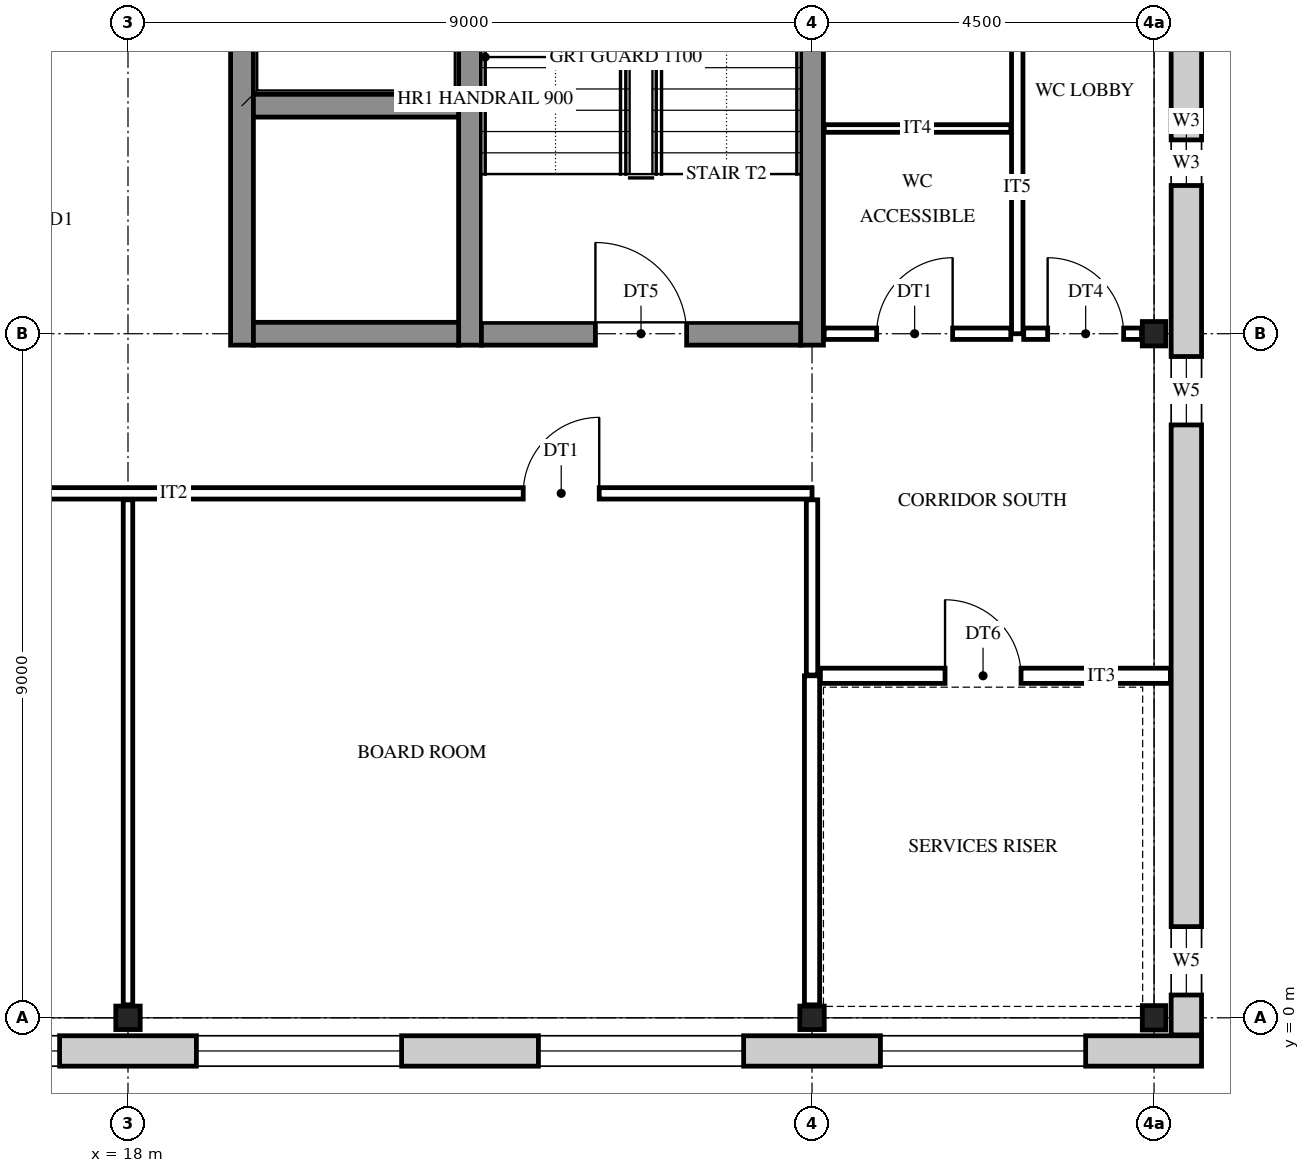
"""IFC4 building model, lengths in metres.
Left out: names, types, materials, properties, quantities, classifications, styles, units other than length and angle.
Written with IfcOpenShell. Run it as: python <this file> out.ifc"""

import sys

from ifc_helpers import new_model, si_unit, direction, frame, frame_2d, origin, origin_2d, place, context, subcontext, project, spatial, rectangle, i_section, extrude, element, fill, save


model = new_model("IFC4")
c1 = context("Model", 3, precision=1e-05, world=origin(), true_north=direction((0.0, 1.0)))
c2 = subcontext(c1, "Body", "Model", "MODEL_VIEW")
j1 = project(units=[si_unit("LENGTHUNIT", "METRE"), si_unit("PLANEANGLEUNIT", "RADIAN")], contexts=[c1])
p1 = place(None, origin())
s1 = spatial("IfcSite", under=j1, at=p1, CompositionType="ELEMENT")
p2 = place(p1, origin())
s2 = spatial("IfcBuilding", under=s1, at=p2, CompositionType="ELEMENT")
p3 = place(p2, frame((0.0, 0.0, 57.0)))
s3 = spatial("IfcBuildingStorey", under=s2, at=p3, CompositionType="ELEMENT", Elevation=57.0)
for number, where, z_axis, x_axis in (
    (1, (18.0, 0.0, 0.0), (0.0, 0.0, 1.0), (0.0, 1.0, 0.0)),
    (2, (27.0, 0.0, 0.0), (0.0, 0.0, 1.0), (0.0, 1.0, 0.0)),
    (3, (31.5, 0.0, 0.0), (0.0, 0.0, 1.0), (1.0, 0.0, 0.0)),
    (4, (31.5, 9.0, 0.0), (0.0, 0.0, 1.0), (1.0, 0.0, 0.0)),
):
    element("IfcColumn", number, at=place(p3, frame(where, z_axis=z_axis, x_axis=x_axis)), inside=s3, PredefinedType="COLUMN", context=c2, shape_type="SweptSolid", body=[
        extrude(i_section(OverallWidth=0.309, OverallDepth=0.321, WebThickness=0.014, FlangeThickness=0.022, FilletRadius=0.017, at=origin_2d()), origin(), (0.0, 0.0, 1.0), 4.2),
    ])
p4 = place(p3, frame((19.5, 8.85, 0.0), z_axis=(0.0, 0.0, 1.0), x_axis=(0.0, 1.0, 0.0)))
e5 = element("IfcWall", 5, at=p4, inside=s3, PredefinedType="SHEAR", context=c2, shape_type="SweptSolid", body=[
    extrude(rectangle(XDim=9.3, YDim=0.3, at=frame_2d((4.65, 0.0))), origin(), (0.0, 0.0, 1.0), 4.2),
])
p5 = place(p4, frame((3.95, 0.0, 0.0)))
e6 = element("IfcOpeningElement", 6, at=p5, cuts=e5, PredefinedType="OPENING", context=c2, shape_type="SweptSolid", body=[
    extrude(rectangle(XDim=1.4, YDim=2.1, at=frame_2d((0.7, 1.05))), frame((0.0, 0.16, 0.0), z_axis=(0.0, -1.0, 0.0), x_axis=(1.0, 0.0, 0.0)), (0.0, 0.0, 1.0), 0.32),
])
p6 = place(p4, frame((7.1, 0.0, 0.0)))
e7 = element("IfcOpeningElement", 7, at=p6, cuts=e5, PredefinedType="OPENING", context=c2, shape_type="SweptSolid", body=[
    extrude(rectangle(XDim=1.1, YDim=2.1, at=frame_2d((0.55, 1.05))), frame((0.0, 0.16, 0.0), z_axis=(0.0, -1.0, 0.0), x_axis=(1.0, 0.0, 0.0)), (0.0, 0.0, 1.0), 0.32),
])
for number, where, z_axis, x_axis in (
    (8, (22.5, 8.85, 0.0), (0.0, 0.0, 1.0), (0.0, 1.0, 0.0)),
    (9, (27.0, 8.85, 0.0), (0.0, 0.0, 1.0), (0.0, 1.0, 0.0)),
):
    element("IfcWall", number, at=place(p3, frame(where, z_axis=z_axis, x_axis=x_axis)), inside=s3, PredefinedType="SHEAR", context=c2, shape_type="SweptSolid", body=[
        extrude(rectangle(XDim=9.3, YDim=0.3, at=frame_2d((4.65, 0.0))), origin(), (0.0, 0.0, 1.0), 4.2),
    ])
p7 = place(p3, frame((19.65, 9.0, 0.0), z_axis=(0.0, 0.0, 1.0), x_axis=(1.0, 0.0, 0.0)))
e10 = element("IfcWall", 10, at=p7, inside=s3, PredefinedType="SHEAR", context=c2, shape_type="SweptSolid", body=[
    extrude(rectangle(XDim=2.7, YDim=0.3, at=frame_2d((1.35, 0.0))), origin(), (0.0, 0.0, 1.0), 4.2),
])
p8 = place(p3, frame((22.65, 9.0, 0.0), z_axis=(0.0, 0.0, 1.0), x_axis=(1.0, 0.0, 0.0)))
e11 = element("IfcWall", 11, at=p8, inside=s3, PredefinedType="SHEAR", context=c2, shape_type="SweptSolid", body=[
    extrude(rectangle(XDim=4.2, YDim=0.3, at=frame_2d((2.1, 0.0))), origin(), (0.0, 0.0, 1.0), 4.2),
])
p9 = place(p8, frame((1.5, 0.0, 0.0)))
e12 = element("IfcOpeningElement", 12, at=p9, cuts=e11, PredefinedType="OPENING", context=c2, shape_type="SweptSolid", body=[
    extrude(rectangle(XDim=1.2, YDim=2.1, at=frame_2d((0.6, 1.05))), frame((0.0, 0.16, 0.0), z_axis=(0.0, -1.0, 0.0), x_axis=(1.0, 0.0, 0.0)), (0.0, 0.0, 1.0), 0.32),
])
p10 = place(p3, frame((19.65, 12.0, 0.0), z_axis=(0.0, 0.0, 1.0), x_axis=(1.0, 0.0, 0.0)))
e13 = element("IfcWall", 13, at=p10, inside=s3, PredefinedType="SHEAR", context=c2, shape_type="SweptSolid", body=[
    extrude(rectangle(XDim=2.7, YDim=0.3, at=frame_2d((1.35, 0.0))), origin(), (0.0, 0.0, 1.0), 4.2),
])
p11 = place(p3, frame((32.125, -0.436, 0.0), z_axis=(0.0, 0.0, 1.0), x_axis=(-1.0, 0.0, 0.0)))
e14 = element("IfcWall", 14, at=p11, inside=s3, PredefinedType="STANDARD", context=c2, shape_type="SweptSolid", body=[
    extrude(rectangle(XDim=32.75, YDim=0.4, at=frame_2d((16.375, 0.0))), origin(), (0.0, 0.0, 1.0), 4.2),
])
p12 = place(p11, frame((28.525, 0.0, 0.9)))
e15 = element("IfcOpeningElement", 15, at=p12, cuts=e14, PredefinedType="OPENING", context=c2, shape_type="SweptSolid", body=[
    extrude(rectangle(XDim=2.7, YDim=2.5, at=frame_2d((1.35, 1.25))), frame((0.0, 0.21, 0.0), z_axis=(0.0, -1.0, 0.0), x_axis=(1.0, 0.0, 0.0)), (0.0, 0.0, 1.0), 0.42),
])
p13 = place(p11, frame((24.025, 0.0, 0.9)))
e16 = element("IfcOpeningElement", 16, at=p13, cuts=e14, PredefinedType="OPENING", context=c2, shape_type="SweptSolid", body=[
    extrude(rectangle(XDim=2.7, YDim=2.5, at=frame_2d((1.35, 1.25))), frame((0.0, 0.21, 0.0), z_axis=(0.0, -1.0, 0.0), x_axis=(1.0, 0.0, 0.0)), (0.0, 0.0, 1.0), 0.42),
])
p14 = place(p11, frame((19.525, 0.0, 0.9)))
e17 = element("IfcOpeningElement", 17, at=p14, cuts=e14, PredefinedType="OPENING", context=c2, shape_type="SweptSolid", body=[
    extrude(rectangle(XDim=2.7, YDim=2.5, at=frame_2d((1.35, 1.25))), frame((0.0, 0.21, 0.0), z_axis=(0.0, -1.0, 0.0), x_axis=(1.0, 0.0, 0.0)), (0.0, 0.0, 1.0), 0.42),
])
p15 = place(p11, frame((15.025, 0.0, 0.9)))
e18 = element("IfcOpeningElement", 18, at=p15, cuts=e14, PredefinedType="OPENING", context=c2, shape_type="SweptSolid", body=[
    extrude(rectangle(XDim=2.7, YDim=2.5, at=frame_2d((1.35, 1.25))), frame((0.0, 0.21, 0.0), z_axis=(0.0, -1.0, 0.0), x_axis=(1.0, 0.0, 0.0)), (0.0, 0.0, 1.0), 0.42),
])
p16 = place(p11, frame((10.525, 0.0, 0.9)))
e19 = element("IfcOpeningElement", 19, at=p16, cuts=e14, PredefinedType="OPENING", context=c2, shape_type="SweptSolid", body=[
    extrude(rectangle(XDim=2.7, YDim=2.5, at=frame_2d((1.35, 1.25))), frame((0.0, 0.21, 0.0), z_axis=(0.0, -1.0, 0.0), x_axis=(1.0, 0.0, 0.0)), (0.0, 0.0, 1.0), 0.42),
])
p17 = place(p11, frame((6.025, 0.0, 0.9)))
e20 = element("IfcOpeningElement", 20, at=p17, cuts=e14, PredefinedType="OPENING", context=c2, shape_type="SweptSolid", body=[
    extrude(rectangle(XDim=2.7, YDim=2.5, at=frame_2d((1.35, 1.25))), frame((0.0, 0.21, 0.0), z_axis=(0.0, -1.0, 0.0), x_axis=(1.0, 0.0, 0.0)), (0.0, 0.0, 1.0), 0.42),
])
p18 = place(p11, frame((1.525, 0.0, 0.9)))
e21 = element("IfcOpeningElement", 21, at=p18, cuts=e14, PredefinedType="OPENING", context=c2, shape_type="SweptSolid", body=[
    extrude(rectangle(XDim=2.7, YDim=2.5, at=frame_2d((1.35, 1.25))), frame((0.0, 0.21, 0.0), z_axis=(0.0, -1.0, 0.0), x_axis=(1.0, 0.0, 0.0)), (0.0, 0.0, 1.0), 0.42),
])
p19 = place(p3, frame((31.925, 27.225, 0.0), z_axis=(0.0, 0.0, 1.0), x_axis=(0.0, -1.0, 0.0)))
e22 = element("IfcWall", 22, at=p19, inside=s3, PredefinedType="STANDARD", context=c2, shape_type="SweptSolid", body=[
    extrude(rectangle(XDim=27.45, YDim=0.4, at=frame_2d((13.725, 0.0))), origin(), (0.0, 0.0, 1.0), 4.2),
])
p20 = place(p19, frame((26.025, 0.0, 0.9)))
e23 = element("IfcOpeningElement", 23, at=p20, cuts=e22, PredefinedType="OPENING", context=c2, shape_type="SweptSolid", body=[
    extrude(rectangle(XDim=0.9, YDim=2.0, at=frame_2d((0.45, 1.0))), frame((0.0, 0.21, 0.0), z_axis=(0.0, -1.0, 0.0), x_axis=(1.0, 0.0, 0.0)), (0.0, 0.0, 1.0), 0.42),
])
p21 = place(p19, frame((18.525, 0.0, 0.9)))
e24 = element("IfcOpeningElement", 24, at=p21, cuts=e22, PredefinedType="OPENING", context=c2, shape_type="SweptSolid", body=[
    extrude(rectangle(XDim=0.9, YDim=2.0, at=frame_2d((0.45, 1.0))), frame((0.0, 0.21, 0.0), z_axis=(0.0, -1.0, 0.0), x_axis=(1.0, 0.0, 0.0)), (0.0, 0.0, 1.0), 0.42),
])
p22 = place(p19, frame((15.675, 0.0, 1.6)))
e25 = element("IfcOpeningElement", 25, at=p22, cuts=e22, PredefinedType="OPENING", context=c2, shape_type="SweptSolid", body=[
    extrude(rectangle(XDim=0.6, YDim=0.9, at=frame_2d((0.3, 0.45))), frame((0.0, 0.21, 0.0), z_axis=(0.0, -1.0, 0.0), x_axis=(1.0, 0.0, 0.0)), (0.0, 0.0, 1.0), 0.42),
])
p23 = place(p19, frame((11.175, 0.0, 1.6)))
e26 = element("IfcOpeningElement", 26, at=p23, cuts=e22, PredefinedType="OPENING", context=c2, shape_type="SweptSolid", body=[
    extrude(rectangle(XDim=0.6, YDim=0.9, at=frame_2d((0.3, 0.45))), frame((0.0, 0.21, 0.0), z_axis=(0.0, -1.0, 0.0), x_axis=(1.0, 0.0, 0.0)), (0.0, 0.0, 1.0), 0.42),
])
p24 = place(p19, frame((8.025, 0.0, 0.9)))
e27 = element("IfcOpeningElement", 27, at=p24, cuts=e22, PredefinedType="OPENING", context=c2, shape_type="SweptSolid", body=[
    extrude(rectangle(XDim=0.9, YDim=2.0, at=frame_2d((0.45, 1.0))), frame((0.0, 0.21, 0.0), z_axis=(0.0, -1.0, 0.0), x_axis=(1.0, 0.0, 0.0)), (0.0, 0.0, 1.0), 0.42),
])
p25 = place(p19, frame((0.525, 0.0, 0.9)))
e28 = element("IfcOpeningElement", 28, at=p25, cuts=e22, PredefinedType="OPENING", context=c2, shape_type="SweptSolid", body=[
    extrude(rectangle(XDim=0.9, YDim=2.0, at=frame_2d((0.45, 1.0))), frame((0.0, 0.21, 0.0), z_axis=(0.0, -1.0, 0.0), x_axis=(1.0, 0.0, 0.0)), (0.0, 0.0, 1.0), 0.42),
])
p26 = place(p3, frame((18.0, 0.17, 0.0), z_axis=(0.0, 0.0, 1.0), x_axis=(0.0, 1.0, 0.0)))
e29 = element("IfcWall", 29, at=p26, inside=s3, PredefinedType="PARTITIONING", context=c2, shape_type="SweptSolid", body=[
    extrude(rectangle(XDim=6.645, YDim=0.125, at=frame_2d((3.322, 0.0))), origin(), (0.0, 0.0, 1.0), 3.542),
])
p27 = place(p3, frame((27.0, 0.17, 0.0), z_axis=(0.0, 0.0, 1.0), x_axis=(0.0, 1.0, 0.0)))
e30 = element("IfcWall", 30, at=p27, inside=s3, PredefinedType="PARTITIONING", context=c2, shape_type="SweptSolid", body=[
    extrude(rectangle(XDim=4.33, YDim=0.2, at=frame_2d((2.165, 0.0))), origin(), (0.0, 0.0, 1.0), 3.542),
])
p28 = place(p3, frame((27.0, 4.51, 0.0), z_axis=(0.0, 0.0, 1.0), x_axis=(0.0, 1.0, 0.0)))
e31 = element("IfcWall", 31, at=p28, inside=s3, PredefinedType="PARTITIONING", context=c2, shape_type="SweptSolid", body=[
    extrude(rectangle(XDim=2.305, YDim=0.15, at=frame_2d((1.152, 0.0))), origin(), (0.0, 0.0, 1.0), 3.542),
])
p29 = place(p3, frame((29.7, 9.0, 0.0), z_axis=(0.0, 0.0, 1.0), x_axis=(0.0, 1.0, 0.0)))
e32 = element("IfcWall", 32, at=p29, inside=s3, PredefinedType="PARTITIONING", context=c2, shape_type="SweptSolid", body=[
    extrude(rectangle(XDim=6.3, YDim=0.15, at=frame_2d((3.15, 0.0))), origin(), (0.0, 0.0, 1.0), 3.542),
])
p30 = place(p29, frame((4.0, 0.0, 0.0)))
e33 = element("IfcOpeningElement", 33, at=p30, cuts=e32, PredefinedType="OPENING", context=c2, shape_type="SweptSolid", body=[
    extrude(rectangle(XDim=1.0, YDim=2.1, at=frame_2d((0.5, 1.05))), frame((0.0, 0.085, 0.0), z_axis=(0.0, -1.0, 0.0), x_axis=(1.0, 0.0, 0.0)), (0.0, 0.0, 1.0), 0.17),
])
p31 = place(p3, frame((27.11, 4.5, 0.0), z_axis=(0.0, 0.0, 1.0), x_axis=(1.0, 0.0, 0.0)))
e34 = element("IfcWall", 34, at=p31, inside=s3, PredefinedType="PARTITIONING", context=c2, shape_type="SweptSolid", body=[
    extrude(rectangle(XDim=4.605, YDim=0.2, at=frame_2d((2.302, 0.0))), origin(), (0.0, 0.0, 1.0), 3.542),
])
p32 = place(p31, frame((1.64, 0.0, 0.0)))
e35 = element("IfcOpeningElement", 35, at=p32, cuts=e34, PredefinedType="OPENING", context=c2, shape_type="SweptSolid", body=[
    extrude(rectangle(XDim=1.0, YDim=2.1, at=frame_2d((0.5, 1.05))), frame((0.0, 0.11, 0.0), z_axis=(0.0, -1.0, 0.0), x_axis=(1.0, 0.0, 0.0)), (0.0, 0.0, 1.0), 0.22),
])
p33 = place(p3, frame((6.9, 6.9, 0.0), z_axis=(0.0, 0.0, 1.0), x_axis=(1.0, 0.0, 0.0)))
e36 = element("IfcWall", 36, at=p33, inside=s3, PredefinedType="PARTITIONING", context=c2, shape_type="SweptSolid", body=[
    extrude(rectangle(XDim=20.1, YDim=0.15, at=frame_2d((10.05, 0.0))), origin(), (0.0, 0.0, 1.0), 3.542),
])
p34 = place(p33, frame((0.15, 0.0, 0.0)))
e37 = element("IfcOpeningElement", 37, at=p34, cuts=e36, PredefinedType="OPENING", context=c2, shape_type="SweptSolid", body=[
    extrude(rectangle(XDim=1.0, YDim=2.1, at=frame_2d((0.5, 1.05))), frame((0.0, 0.085, 0.0), z_axis=(0.0, -1.0, 0.0), x_axis=(1.0, 0.0, 0.0)), (0.0, 0.0, 1.0), 0.17),
])
p35 = place(p33, frame((6.1, 0.0, 0.0)))
e38 = element("IfcOpeningElement", 38, at=p35, cuts=e36, PredefinedType="OPENING", context=c2, shape_type="SweptSolid", body=[
    extrude(rectangle(XDim=1.0, YDim=2.1, at=frame_2d((0.5, 1.05))), frame((0.0, 0.085, 0.0), z_axis=(0.0, -1.0, 0.0), x_axis=(1.0, 0.0, 0.0)), (0.0, 0.0, 1.0), 0.17),
])
p36 = place(p33, frame((16.3, 0.0, 0.0)))
e39 = element("IfcOpeningElement", 39, at=p36, cuts=e36, PredefinedType="OPENING", context=c2, shape_type="SweptSolid", body=[
    extrude(rectangle(XDim=1.0, YDim=2.1, at=frame_2d((0.5, 1.05))), frame((0.0, 0.085, 0.0), z_axis=(0.0, -1.0, 0.0), x_axis=(1.0, 0.0, 0.0)), (0.0, 0.0, 1.0), 0.17),
])
p37 = place(p3, frame((27.16, 9.0, 0.0), z_axis=(0.0, 0.0, 1.0), x_axis=(1.0, 0.0, 0.0)))
e40 = element("IfcWall", 40, at=p37, inside=s3, PredefinedType="PARTITIONING", context=c2, shape_type="SweptSolid", body=[
    extrude(rectangle(XDim=2.455, YDim=0.15, at=frame_2d((1.228, 0.0))), origin(), (0.0, 0.0, 1.0), 3.542),
])
p38 = place(p37, frame((0.69, 0.0, 0.0)))
e41 = element("IfcOpeningElement", 41, at=p38, cuts=e40, PredefinedType="OPENING", context=c2, shape_type="SweptSolid", body=[
    extrude(rectangle(XDim=1.0, YDim=2.1, at=frame_2d((0.5, 1.05))), frame((0.0, 0.085, 0.0), z_axis=(0.0, -1.0, 0.0), x_axis=(1.0, 0.0, 0.0)), (0.0, 0.0, 1.0), 0.17),
])
p39 = place(p3, frame((29.785, 9.0, 0.0), z_axis=(0.0, 0.0, 1.0), x_axis=(1.0, 0.0, 0.0)))
e42 = element("IfcWall", 42, at=p39, inside=s3, PredefinedType="PARTITIONING", context=c2, shape_type="SweptSolid", body=[
    extrude(rectangle(XDim=1.551, YDim=0.15, at=frame_2d((0.775, 0.0))), origin(), (0.0, 0.0, 1.0), 3.542),
])
p40 = place(p39, frame((0.315, 0.0, 0.0)))
e43 = element("IfcOpeningElement", 43, at=p40, cuts=e42, PredefinedType="OPENING", context=c2, shape_type="SweptSolid", body=[
    extrude(rectangle(XDim=1.0, YDim=2.1, at=frame_2d((0.5, 1.05))), frame((0.0, 0.085, 0.0), z_axis=(0.0, -1.0, 0.0), x_axis=(1.0, 0.0, 0.0)), (0.0, 0.0, 1.0), 0.17),
])
p41 = place(p3, frame((27.16, 11.7, 0.0), z_axis=(0.0, 0.0, 1.0), x_axis=(1.0, 0.0, 0.0)))
e44 = element("IfcWall", 44, at=p41, inside=s3, PredefinedType="PARTITIONING", context=c2, shape_type="SweptSolid", body=[
    extrude(rectangle(XDim=2.455, YDim=0.1, at=frame_2d((1.228, 0.0))), origin(), (0.0, 0.0, 1.0), 3.542),
])
p42 = place(p15, origin())
e45 = element("IfcWindow", 45, at=p42, inside=s3, PartitioningType="SINGLE_PANEL", PredefinedType="WINDOW", context=c2, shape_type="SweptSolid", body=[
    extrude(rectangle(XDim=2.7, YDim=2.5, at=frame_2d((1.35, 1.25))), frame((0.0, 0.03, 0.0), z_axis=(0.0, -1.0, 0.0), x_axis=(1.0, 0.0, 0.0)), (0.0, 0.0, 1.0), 0.06),
])
fill(e18, e45)
p43 = place(p16, origin())
e46 = element("IfcWindow", 46, at=p43, inside=s3, PartitioningType="SINGLE_PANEL", PredefinedType="WINDOW", context=c2, shape_type="SweptSolid", body=[
    extrude(rectangle(XDim=2.7, YDim=2.5, at=frame_2d((1.35, 1.25))), frame((0.0, 0.03, 0.0), z_axis=(0.0, -1.0, 0.0), x_axis=(1.0, 0.0, 0.0)), (0.0, 0.0, 1.0), 0.06),
])
fill(e19, e46)
p44 = place(p17, origin())
e47 = element("IfcWindow", 47, at=p44, inside=s3, PartitioningType="SINGLE_PANEL", PredefinedType="WINDOW", context=c2, shape_type="SweptSolid", body=[
    extrude(rectangle(XDim=2.7, YDim=2.5, at=frame_2d((1.35, 1.25))), frame((0.0, 0.03, 0.0), z_axis=(0.0, -1.0, 0.0), x_axis=(1.0, 0.0, 0.0)), (0.0, 0.0, 1.0), 0.06),
])
fill(e20, e47)
p45 = place(p18, origin())
e48 = element("IfcWindow", 48, at=p45, inside=s3, PartitioningType="SINGLE_PANEL", PredefinedType="WINDOW", context=c2, shape_type="SweptSolid", body=[
    extrude(rectangle(XDim=2.7, YDim=2.5, at=frame_2d((1.35, 1.25))), frame((0.0, 0.03, 0.0), z_axis=(0.0, -1.0, 0.0), x_axis=(1.0, 0.0, 0.0)), (0.0, 0.0, 1.0), 0.06),
])
fill(e21, e48)
p46 = place(p20, origin())
e49 = element("IfcWindow", 49, at=p46, inside=s3, PartitioningType="SINGLE_PANEL", PredefinedType="WINDOW", context=c2, shape_type="SweptSolid", body=[
    extrude(rectangle(XDim=0.9, YDim=2.0, at=frame_2d((0.45, 1.0))), frame((0.0, 0.03, 0.0), z_axis=(0.0, -1.0, 0.0), x_axis=(1.0, 0.0, 0.0)), (0.0, 0.0, 1.0), 0.06),
])
fill(e23, e49)
p47 = place(p21, origin())
e50 = element("IfcWindow", 50, at=p47, inside=s3, PartitioningType="SINGLE_PANEL", PredefinedType="WINDOW", context=c2, shape_type="SweptSolid", body=[
    extrude(rectangle(XDim=0.9, YDim=2.0, at=frame_2d((0.45, 1.0))), frame((0.0, 0.03, 0.0), z_axis=(0.0, -1.0, 0.0), x_axis=(1.0, 0.0, 0.0)), (0.0, 0.0, 1.0), 0.06),
])
fill(e24, e50)
p48 = place(p22, origin())
e51 = element("IfcWindow", 51, at=p48, inside=s3, PartitioningType="SINGLE_PANEL", PredefinedType="WINDOW", context=c2, shape_type="SweptSolid", body=[
    extrude(rectangle(XDim=0.6, YDim=0.9, at=frame_2d((0.3, 0.45))), frame((0.0, 0.03, 0.0), z_axis=(0.0, -1.0, 0.0), x_axis=(1.0, 0.0, 0.0)), (0.0, 0.0, 1.0), 0.06),
])
fill(e25, e51)
p49 = place(p9, origin())
e52 = element("IfcDoor", 52, at=p49, inside=s3, OperationType="SINGLE_SWING_LEFT", PredefinedType="DOOR", context=c2, shape_type="SweptSolid", body=[
    extrude(rectangle(XDim=1.2, YDim=2.1, at=frame_2d((0.6, 1.05))), frame((0.0, 0.025, 0.0), z_axis=(0.0, -1.0, 0.0), x_axis=(1.0, 0.0, 0.0)), (0.0, 0.0, 1.0), 0.05),
])
fill(e12, e52)
p50 = place(p38, origin())
e53 = element("IfcDoor", 53, at=p50, inside=s3, OperationType="SINGLE_SWING_RIGHT", PredefinedType="DOOR", context=c2, shape_type="SweptSolid", body=[
    extrude(rectangle(XDim=1.0, YDim=2.1, at=frame_2d((0.5, 1.05))), frame((0.0, 0.025, 0.0), z_axis=(0.0, -1.0, 0.0), x_axis=(1.0, 0.0, 0.0)), (0.0, 0.0, 1.0), 0.05),
])
fill(e41, e53)
p51 = place(p40, origin())
e54 = element("IfcDoor", 54, at=p51, inside=s3, OperationType="SINGLE_SWING_LEFT", PredefinedType="DOOR", context=c2, shape_type="SweptSolid", body=[
    extrude(rectangle(XDim=1.0, YDim=2.1, at=frame_2d((0.5, 1.05))), frame((0.0, 0.025, 0.0), z_axis=(0.0, -1.0, 0.0), x_axis=(1.0, 0.0, 0.0)), (0.0, 0.0, 1.0), 0.05),
])
fill(e43, e54)
p52 = place(p32, frame((1.0, 0.0, 0.0), z_axis=(0.0, 0.0, 1.0), x_axis=(-1.0, 0.0, 0.0)))
e55 = element("IfcDoor", 55, at=p52, inside=s3, OperationType="SINGLE_SWING_LEFT", PredefinedType="DOOR", context=c2, shape_type="SweptSolid", body=[
    extrude(rectangle(XDim=1.0, YDim=2.1, at=frame_2d((0.5, 1.05))), frame((0.0, 0.025, 0.0), z_axis=(0.0, -1.0, 0.0), x_axis=(1.0, 0.0, 0.0)), (0.0, 0.0, 1.0), 0.05),
])
fill(e35, e55)
p53 = place(p36, frame((1.0, 0.0, 0.0), z_axis=(0.0, 0.0, 1.0), x_axis=(-1.0, 0.0, 0.0)))
e56 = element("IfcDoor", 56, at=p53, inside=s3, OperationType="SINGLE_SWING_RIGHT", PredefinedType="DOOR", context=c2, shape_type="SweptSolid", body=[
    extrude(rectangle(XDim=1.0, YDim=2.1, at=frame_2d((0.5, 1.05))), frame((0.0, 0.025, 0.0), z_axis=(0.0, -1.0, 0.0), x_axis=(1.0, 0.0, 0.0)), (0.0, 0.0, 1.0), 0.05),
])
fill(e39, e56)
save(model, sys.argv[1])
